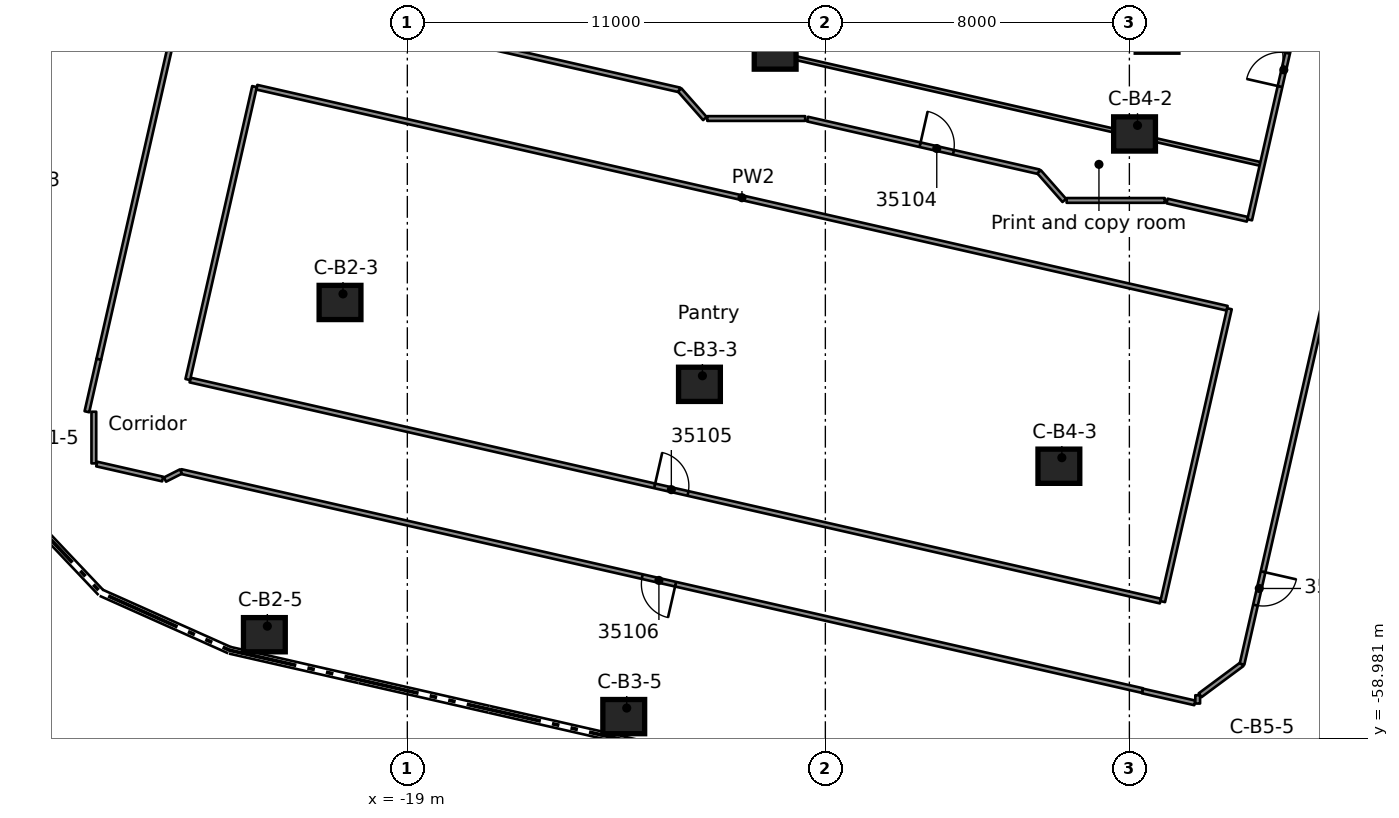
"""IFC4 building model, lengths in metres.
Left out: names, types, materials, properties, quantities, classifications, styles, units other than length and angle.
Written with IfcOpenShell. Run it as: python <this file> out.ifc"""

import sys

from ifc_helpers import new_model, si_unit, direction, frame, frame_2d, origin, origin_2d, place, context, subcontext, project, spatial, rectangle, extrude, element, fill, save


model = new_model("IFC4")
c1 = context("Model", 3, precision=1e-05, world=origin(), true_north=direction((0.0, 1.0)))
c2 = subcontext(c1, "Body", "Model", "MODEL_VIEW")
j1 = project(units=[si_unit("LENGTHUNIT", "METRE"), si_unit("PLANEANGLEUNIT", "RADIAN")], contexts=[c1])
p1 = place(None, origin())
s1 = spatial("IfcSite", under=j1, at=p1, CompositionType="ELEMENT")
p2 = place(p1, origin())
s2 = spatial("IfcBuilding", under=s1, at=p2, CompositionType="ELEMENT")
p3 = place(p2, frame((0.0, 0.0, 170.6)))
s3 = spatial("IfcBuildingStorey", under=s2, at=p3, CompositionType="ELEMENT", Elevation=170.6)
for number, where, z_axis, x_axis in (
    (1, (-20.771, -47.507, 0.0), (0.0, 0.0, 1.0), (1.0, 0.0, 0.0)),
    (2, (-22.762, -56.249, 0.0), (0.0, 0.0, 1.0), (1.0, 0.0, 0.0)),
    (3, (-9.321, -40.918, 0.0), (0.0, 0.0, 1.0), (1.0, 0.0, 0.0)),
    (4, (-11.313, -49.661, 0.0), (0.0, 0.0, 1.0), (1.0, 0.0, 0.0)),
    (5, (-13.305, -58.404, 0.0), (0.0, 0.0, 1.0), (1.0, 0.0, 0.0)),
    (6, (0.136, -43.073, 0.0), (0.0, 0.0, 1.0), (1.0, 0.0, 0.0)),
    (7, (-1.855, -51.816, 0.0), (0.0, 0.0, 1.0), (1.0, 0.0, 0.0)),
    (8, (0.729, -40.473, 0.0), (0.0, 0.0, 1.0), (1.0, 0.0, 0.0)),
):
    element("IfcColumn", number, at=place(p3, frame(where, z_axis=z_axis, x_axis=x_axis)), inside=s3, PredefinedType="COLUMN", context=c2, shape_type="SweptSolid", body=[
        extrude(rectangle(XDim=1.1, YDim=0.9, at=origin_2d()), origin(), (0.0, 0.0, 1.0), 3.5),
    ])
p4 = place(p3, frame((-27.173, -51.758, 0.0), z_axis=(0.0, 0.0, 1.0), x_axis=(0.975050579035, -0.221982810874, 0.0)))
e9 = element("IfcWall", 9, at=p4, inside=s3, PredefinedType="PARTITIONING", context=c2, shape_type="SweptSolid", body=[
    extrude(rectangle(XDim=1.78, YDim=0.125, at=frame_2d((0.89, 0.0))), origin(), (0.0, 0.0, 1.0), 3.06),
])
p5 = place(p3, frame((0.342, -57.729, 0.0), z_axis=(0.0, 0.0, 1.0), x_axis=(0.975078596589, -0.22185970899, 0.0)))
e10 = element("IfcWall", 10, at=p5, inside=s3, PredefinedType="PARTITIONING", context=c2, shape_type="SweptSolid", body=[
    extrude(rectangle(XDim=1.415, YDim=0.125, at=frame_2d((0.708, 0.0))), origin(), (0.0, 0.0, 1.0), 3.06),
])
p6 = place(p3, frame((0.344, -57.719, 0.0), z_axis=(0.0, 0.0, 1.0), x_axis=(-0.97501877272, 0.222122472621, 0.0)))
e11 = element("IfcWall", 11, at=p6, inside=s3, PredefinedType="PARTITIONING", context=c2, shape_type="SweptSolid", body=[
    extrude(rectangle(XDim=25.949, YDim=0.125, at=frame_2d((12.975, 0.0))), origin(), (0.0, 0.0, 1.0), 3.06),
])
p7 = place(p6, frame((12.6, 0.0, 0.0)))
e12 = element("IfcOpeningElement", 12, at=p7, cuts=e11, PredefinedType="OPENING", context=c2, shape_type="SweptSolid", body=[
    extrude(rectangle(XDim=0.9, YDim=2.1, at=frame_2d((0.45, 1.05))), frame((0.0, 0.073, 0.0), z_axis=(0.0, -1.0, 0.0), x_axis=(1.0, 0.0, 0.0)), (0.0, 0.0, 1.0), 0.145),
])
p8 = place(p3, frame((-24.716, -49.548, 0.0), z_axis=(0.0, 0.0, 1.0), x_axis=(0.975023843859, -0.222100211404, 0.0)))
e13 = element("IfcWall", 13, at=p8, inside=s3, PredefinedType="PARTITIONING", context=c2, shape_type="SweptSolid", body=[
    extrude(rectangle(XDim=26.186, YDim=0.125, at=frame_2d((13.093, 0.0))), origin(), (0.0, 0.0, 1.0), 3.06),
])
p9 = place(p8, frame((12.538, 0.0, 0.0)))
e14 = element("IfcOpeningElement", 14, at=p9, cuts=e13, PredefinedType="OPENING", context=c2, shape_type="SweptSolid", body=[
    extrude(rectangle(XDim=0.9, YDim=2.1, at=frame_2d((0.45, 1.05))), frame((0.0, 0.073, 0.0), z_axis=(0.0, -1.0, 0.0), x_axis=(1.0, 0.0, 0.0)), (0.0, 0.0, 1.0), 0.145),
])
p10 = place(p3, frame((-22.961, -41.843, 0.0), z_axis=(0.0, 0.0, 1.0), x_axis=(0.975025683381, -0.222092135715, 0.0)))
e15 = element("IfcWall", 15, at=p10, inside=s3, PredefinedType="PARTITIONING", context=c2, shape_type="SweptSolid", body=[
    extrude(rectangle(XDim=26.187, YDim=0.125, at=frame_2d((13.094, 0.0))), origin(), (0.0, 0.0, 1.0), 3.06),
])
p11 = place(p3, frame((-17.924, -40.528, 0.0), z_axis=(0.0, 0.0, 1.0), x_axis=(0.975041788435, -0.2220214197, 0.0)))
e16 = element("IfcWall", 16, at=p11, inside=s3, PredefinedType="PARTITIONING", context=c2, shape_type="SweptSolid", body=[
    extrude(rectangle(XDim=6.247, YDim=0.125, at=frame_2d((3.124, 0.0))), origin(), (0.0, 0.0, 1.0), 3.06),
])
p12 = place(p3, frame((-8.469, -42.682, 0.0), z_axis=(0.0, 0.0, 1.0), x_axis=(0.975048737106, -0.22199090132, 0.0)))
e17 = element("IfcWall", 17, at=p12, inside=s3, PredefinedType="PARTITIONING", context=c2, shape_type="SweptSolid", body=[
    extrude(rectangle(XDim=6.249, YDim=0.125, at=frame_2d((3.125, 0.0))), origin(), (0.0, 0.0, 1.0), 3.06),
])
p13 = place(p12, frame((3.038, 0.0, 0.0)))
e18 = element("IfcOpeningElement", 18, at=p13, cuts=e17, PredefinedType="OPENING", context=c2, shape_type="SweptSolid", body=[
    extrude(rectangle(XDim=0.9, YDim=2.1, at=frame_2d((0.45, 1.05))), frame((0.0, 0.073, 0.0), z_axis=(0.0, -1.0, 0.0), x_axis=(1.0, 0.0, 0.0)), (0.0, 0.0, 1.0), 0.145),
])
p14 = place(p3, frame((0.991, -44.837, 0.0), z_axis=(0.0, 0.0, 1.0), x_axis=(0.97505868901, -0.22194718513, 0.0)))
e19 = element("IfcWall", 19, at=p14, inside=s3, PredefinedType="PARTITIONING", context=c2, shape_type="SweptSolid", body=[
    extrude(rectangle(XDim=2.168, YDim=0.125, at=frame_2d((1.084, 0.0))), origin(), (0.0, 0.0, 1.0), 3.06),
])
p15 = place(p3, frame((-22.095, -38.043, 0.0), z_axis=(0.0, 0.0, 1.0), x_axis=(0.975023843859, -0.222100211404, 0.0)))
e20 = element("IfcWall", 20, at=p15, inside=s3, PredefinedType="PARTITIONING", context=c2, shape_type="SweptSolid", body=[
    extrude(rectangle(XDim=26.186, YDim=0.1, at=frame_2d((13.093, 0.0))), origin(), (0.0, 0.0, 1.0), 3.06),
])
p16 = place(p3, frame((1.861, -57.842, 0.0), z_axis=(0.0, 0.0, 1.0), x_axis=(0.803188576955, 0.595724860862, 0.0)))
e21 = element("IfcWall", 21, at=p16, inside=s3, PredefinedType="PARTITIONING", context=c2, shape_type="SweptSolid", body=[
    extrude(rectangle(XDim=1.373, YDim=0.125, at=frame_2d((0.687, 0.0))), origin(), (0.0, 0.0, 1.0), 3.06),
])
p17 = place(p3, frame((-1.651, -44.822, 0.0), z_axis=(0.0, 0.0, 1.0), x_axis=(1.0, 0.0, 0.0)))
e22 = element("IfcWall", 22, at=p17, inside=s3, PredefinedType="PARTITIONING", context=c2, shape_type="SweptSolid", body=[
    extrude(rectangle(XDim=2.581, YDim=0.125, at=frame_2d((1.291, 0.0))), origin(), (0.0, 0.0, 1.0), 3.06),
])
p18 = place(p3, frame((-11.107, -42.667, 0.0), z_axis=(0.0, 0.0, 1.0), x_axis=(1.0, 0.0, 0.0)))
e23 = element("IfcWall", 23, at=p18, inside=s3, PredefinedType="PARTITIONING", context=c2, shape_type="SweptSolid", body=[
    extrude(rectangle(XDim=2.577, YDim=0.125, at=frame_2d((1.289, 0.0))), origin(), (0.0, 0.0, 1.0), 3.06),
])
p19 = place(p3, frame((-25.377, -52.167, 0.0), z_axis=(0.0, 0.0, 1.0), x_axis=(0.892760073249, 0.450532409058, 0.0)))
e24 = element("IfcWall", 24, at=p19, inside=s3, PredefinedType="PARTITIONING", context=c2, shape_type="SweptSolid", body=[
    extrude(rectangle(XDim=0.47, YDim=0.125, at=frame_2d((0.235, 0.0))), origin(), (0.0, 0.0, 1.0), 3.06),
])
p20 = place(p3, frame((6.424, -41.844, 0.0), z_axis=(0.0, 0.0, 1.0), x_axis=(-0.222230368286, -0.974994186348, 0.0)))
e25 = element("IfcWall", 25, at=p20, inside=s3, PredefinedType="PARTITIONING", context=c2, shape_type="SweptSolid", body=[
    extrude(rectangle(XDim=15.569, YDim=0.125, at=frame_2d((7.785, 0.0))), origin(), (0.0, 0.0, 1.0), 3.06),
])
p21 = place(p20, frame((0.848, 0.0, 0.0)))
e26 = element("IfcOpeningElement", 26, at=p21, cuts=e25, PredefinedType="OPENING", context=c2, shape_type="SweptSolid", body=[
    extrude(rectangle(XDim=1.0, YDim=2.1, at=frame_2d((0.5, 1.05))), frame((0.0, 0.073, 0.0), z_axis=(0.0, -1.0, 0.0), x_axis=(1.0, 0.0, 0.0)), (0.0, 0.0, 1.0), 0.145),
])
p22 = place(p20, frame((13.077, 0.0, 0.0)))
e27 = element("IfcOpeningElement", 27, at=p22, cuts=e25, PredefinedType="OPENING", context=c2, shape_type="SweptSolid", body=[
    extrude(rectangle(XDim=0.9, YDim=2.1, at=frame_2d((0.45, 1.05))), frame((0.0, 0.073, 0.0), z_axis=(0.0, -1.0, 0.0), x_axis=(1.0, 0.0, 0.0)), (0.0, 0.0, 1.0), 0.145),
])
p23 = place(p3, frame((0.877, -55.378, 0.0), z_axis=(0.0, 0.0, 1.0), x_axis=(0.222196517333, 0.975001901375, 0.0)))
e28 = element("IfcWall", 28, at=p23, inside=s3, PredefinedType="PARTITIONING", context=c2, shape_type="SweptSolid", body=[
    extrude(rectangle(XDim=7.903, YDim=0.125, at=frame_2d((3.952, 0.0))), origin(), (0.0, 0.0, 1.0), 3.06),
])
p24 = place(p3, frame((3.166, -45.332, 0.0), z_axis=(0.0, 0.0, 1.0), x_axis=(0.221933270953, 0.975061856112, 0.0)))
e29 = element("IfcWall", 29, at=p24, inside=s3, PredefinedType="PARTITIONING", context=c2, shape_type="SweptSolid", body=[
    extrude(rectangle(XDim=10.783, YDim=0.125, at=frame_2d((5.391, 0.0))), origin(), (0.0, 0.0, 1.0), 3.06),
])
p25 = place(p24, frame((8.249, 0.0, 0.0)))
e30 = element("IfcOpeningElement", 30, at=p25, cuts=e29, PredefinedType="OPENING", context=c2, shape_type="SweptSolid", body=[
    extrude(rectangle(XDim=1.8, YDim=2.1, at=frame_2d((0.9, 1.05))), frame((0.0, 0.073, 0.0), z_axis=(0.0, -1.0, 0.0), x_axis=(1.0, 0.0, 0.0)), (0.0, 0.0, 1.0), 0.145),
])
p26 = place(p24, frame((3.596, 0.0, 0.0)))
e31 = element("IfcOpeningElement", 31, at=p26, cuts=e29, PredefinedType="OPENING", context=c2, shape_type="SweptSolid", body=[
    extrude(rectangle(XDim=0.9, YDim=2.1, at=frame_2d((0.45, 1.05))), frame((0.0, 0.073, 0.0), z_axis=(0.0, -1.0, 0.0), x_axis=(1.0, 0.0, 0.0)), (0.0, 0.0, 1.0), 0.145),
])
p27 = place(p3, frame((-24.777, -49.534, 0.0), z_axis=(0.0, 0.0, 1.0), x_axis=(0.222163061165, 0.975009525212, 0.0)))
e32 = element("IfcWall", 32, at=p27, inside=s3, PredefinedType="PARTITIONING", context=c2, shape_type="SweptSolid", body=[
    extrude(rectangle(XDim=7.905, YDim=0.125, at=frame_2d((3.952, 0.0))), origin(), (0.0, 0.0, 1.0), 3.06),
])
p28 = place(p3, frame((-27.118, -49.001, 0.0), z_axis=(0.0, 0.0, 1.0), x_axis=(0.222212898452, 0.974998168081, 0.0)))
e33 = element("IfcWall", 33, at=p28, inside=s3, PredefinedType="PARTITIONING", context=c2, shape_type="SweptSolid", body=[
    extrude(rectangle(XDim=14.995, YDim=0.125, at=frame_2d((7.498, 0.0))), origin(), (0.0, 0.0, 1.0), 3.06),
])
p29 = place(p28, frame((12.901, 0.0, 0.0)))
e34 = element("IfcOpeningElement", 34, at=p29, cuts=e33, PredefinedType="OPENING", context=c2, shape_type="SweptSolid", body=[
    extrude(rectangle(XDim=0.9, YDim=2.1, at=frame_2d((0.45, 1.05))), frame((0.0, 0.073, 0.0), z_axis=(0.0, -1.0, 0.0), x_axis=(1.0, 0.0, 0.0)), (0.0, 0.0, 1.0), 0.145),
])
p30 = place(p3, frame((-27.432, -50.382, 0.0), z_axis=(0.0, 0.0, 1.0), x_axis=(0.221673255789, 0.975121001552, 0.0)))
e35 = element("IfcWall", 35, at=p30, inside=s3, PredefinedType="PARTITIONING", context=c2, shape_type="SweptSolid", body=[
    extrude(rectangle(XDim=1.416, YDim=0.125, at=frame_2d((0.708, 0.0))), origin(), (0.0, 0.0, 1.0), 3.06),
])
p31 = place(p3, frame((1.798, -58.06, 0.0), z_axis=(0.0, 0.0, 1.0), x_axis=(0.0, 1.0, 0.0)))
e36 = element("IfcWall", 36, at=p31, inside=s3, PredefinedType="PARTITIONING", context=c2, shape_type="SweptSolid", body=[
    extrude(rectangle(XDim=0.218, YDim=0.125, at=frame_2d((0.109, 0.0))), origin(), (0.0, 0.0, 1.0), 3.06),
])
p32 = place(p3, frame((-1.713, -44.822, 0.0), z_axis=(0.0, 0.0, 1.0), x_axis=(-0.660913097692, 0.750462442298, 0.0)))
e37 = element("IfcWall", 37, at=p32, inside=s3, PredefinedType="PARTITIONING", context=c2, shape_type="SweptSolid", body=[
    extrude(rectangle(XDim=1.003, YDim=0.125, at=frame_2d((0.501, 0.0))), origin(), (0.0, 0.0, 1.0), 3.06),
])
p33 = place(p3, frame((-11.17, -42.667, 0.0), z_axis=(0.0, 0.0, 1.0), x_axis=(-0.66139609203, 0.750036805395, 0.0)))
e38 = element("IfcWall", 38, at=p33, inside=s3, PredefinedType="PARTITIONING", context=c2, shape_type="SweptSolid", body=[
    extrude(rectangle(XDim=1.002, YDim=0.125, at=frame_2d((0.501, 0.0))), origin(), (0.0, 0.0, 1.0), 3.06),
])
p34 = place(p3, frame((-27.249, -51.741, 0.0), z_axis=(0.0, 0.0, 1.0), x_axis=(0.0, 1.0, 0.0)))
e39 = element("IfcWall", 39, at=p34, inside=s3, PredefinedType="PARTITIONING", context=c2, shape_type="SweptSolid", body=[
    extrude(rectangle(XDim=1.359, YDim=0.125, at=frame_2d((0.679, 0.0))), origin(), (0.0, 0.0, 1.0), 3.06),
])
p35 = place(p26, origin())
e40 = element("IfcDoor", 40, at=p35, inside=s3, OperationType="SINGLE_SWING_LEFT", PredefinedType="DOOR", context=c2, shape_type="SweptSolid", body=[
    extrude(rectangle(XDim=0.9, YDim=2.1, at=frame_2d((0.45, 1.05))), frame((0.0, 0.025, 0.0), z_axis=(0.0, -1.0, 0.0), x_axis=(1.0, 0.0, 0.0)), (0.0, 0.0, 1.0), 0.05),
])
fill(e31, e40)
p36 = place(p13, origin())
e41 = element("IfcDoor", 41, at=p36, inside=s3, OperationType="SINGLE_SWING_RIGHT", PredefinedType="DOOR", context=c2, shape_type="SweptSolid", body=[
    extrude(rectangle(XDim=0.9, YDim=2.1, at=frame_2d((0.45, 1.05))), frame((0.0, 0.025, 0.0), z_axis=(0.0, -1.0, 0.0), x_axis=(1.0, 0.0, 0.0)), (0.0, 0.0, 1.0), 0.05),
])
fill(e18, e41)
p37 = place(p9, origin())
e42 = element("IfcDoor", 42, at=p37, inside=s3, OperationType="SINGLE_SWING_LEFT", PredefinedType="DOOR", context=c2, shape_type="SweptSolid", body=[
    extrude(rectangle(XDim=0.9, YDim=2.1, at=frame_2d((0.45, 1.05))), frame((0.0, 0.025, 0.0), z_axis=(0.0, -1.0, 0.0), x_axis=(1.0, 0.0, 0.0)), (0.0, 0.0, 1.0), 0.05),
])
fill(e14, e42)
p38 = place(p7, origin())
e43 = element("IfcDoor", 43, at=p38, inside=s3, OperationType="SINGLE_SWING_RIGHT", PredefinedType="DOOR", context=c2, shape_type="SweptSolid", body=[
    extrude(rectangle(XDim=0.9, YDim=2.1, at=frame_2d((0.45, 1.05))), frame((0.0, 0.025, 0.0), z_axis=(0.0, -1.0, 0.0), x_axis=(1.0, 0.0, 0.0)), (0.0, 0.0, 1.0), 0.05),
])
fill(e12, e43)
p39 = place(p22, origin())
e44 = element("IfcDoor", 44, at=p39, inside=s3, OperationType="SINGLE_SWING_RIGHT", PredefinedType="DOOR", context=c2, shape_type="SweptSolid", body=[
    extrude(rectangle(XDim=0.9, YDim=2.1, at=frame_2d((0.45, 1.05))), frame((0.0, 0.025, 0.0), z_axis=(0.0, -1.0, 0.0), x_axis=(1.0, 0.0, 0.0)), (0.0, 0.0, 1.0), 0.05),
])
fill(e27, e44)
save(model, sys.argv[1])
